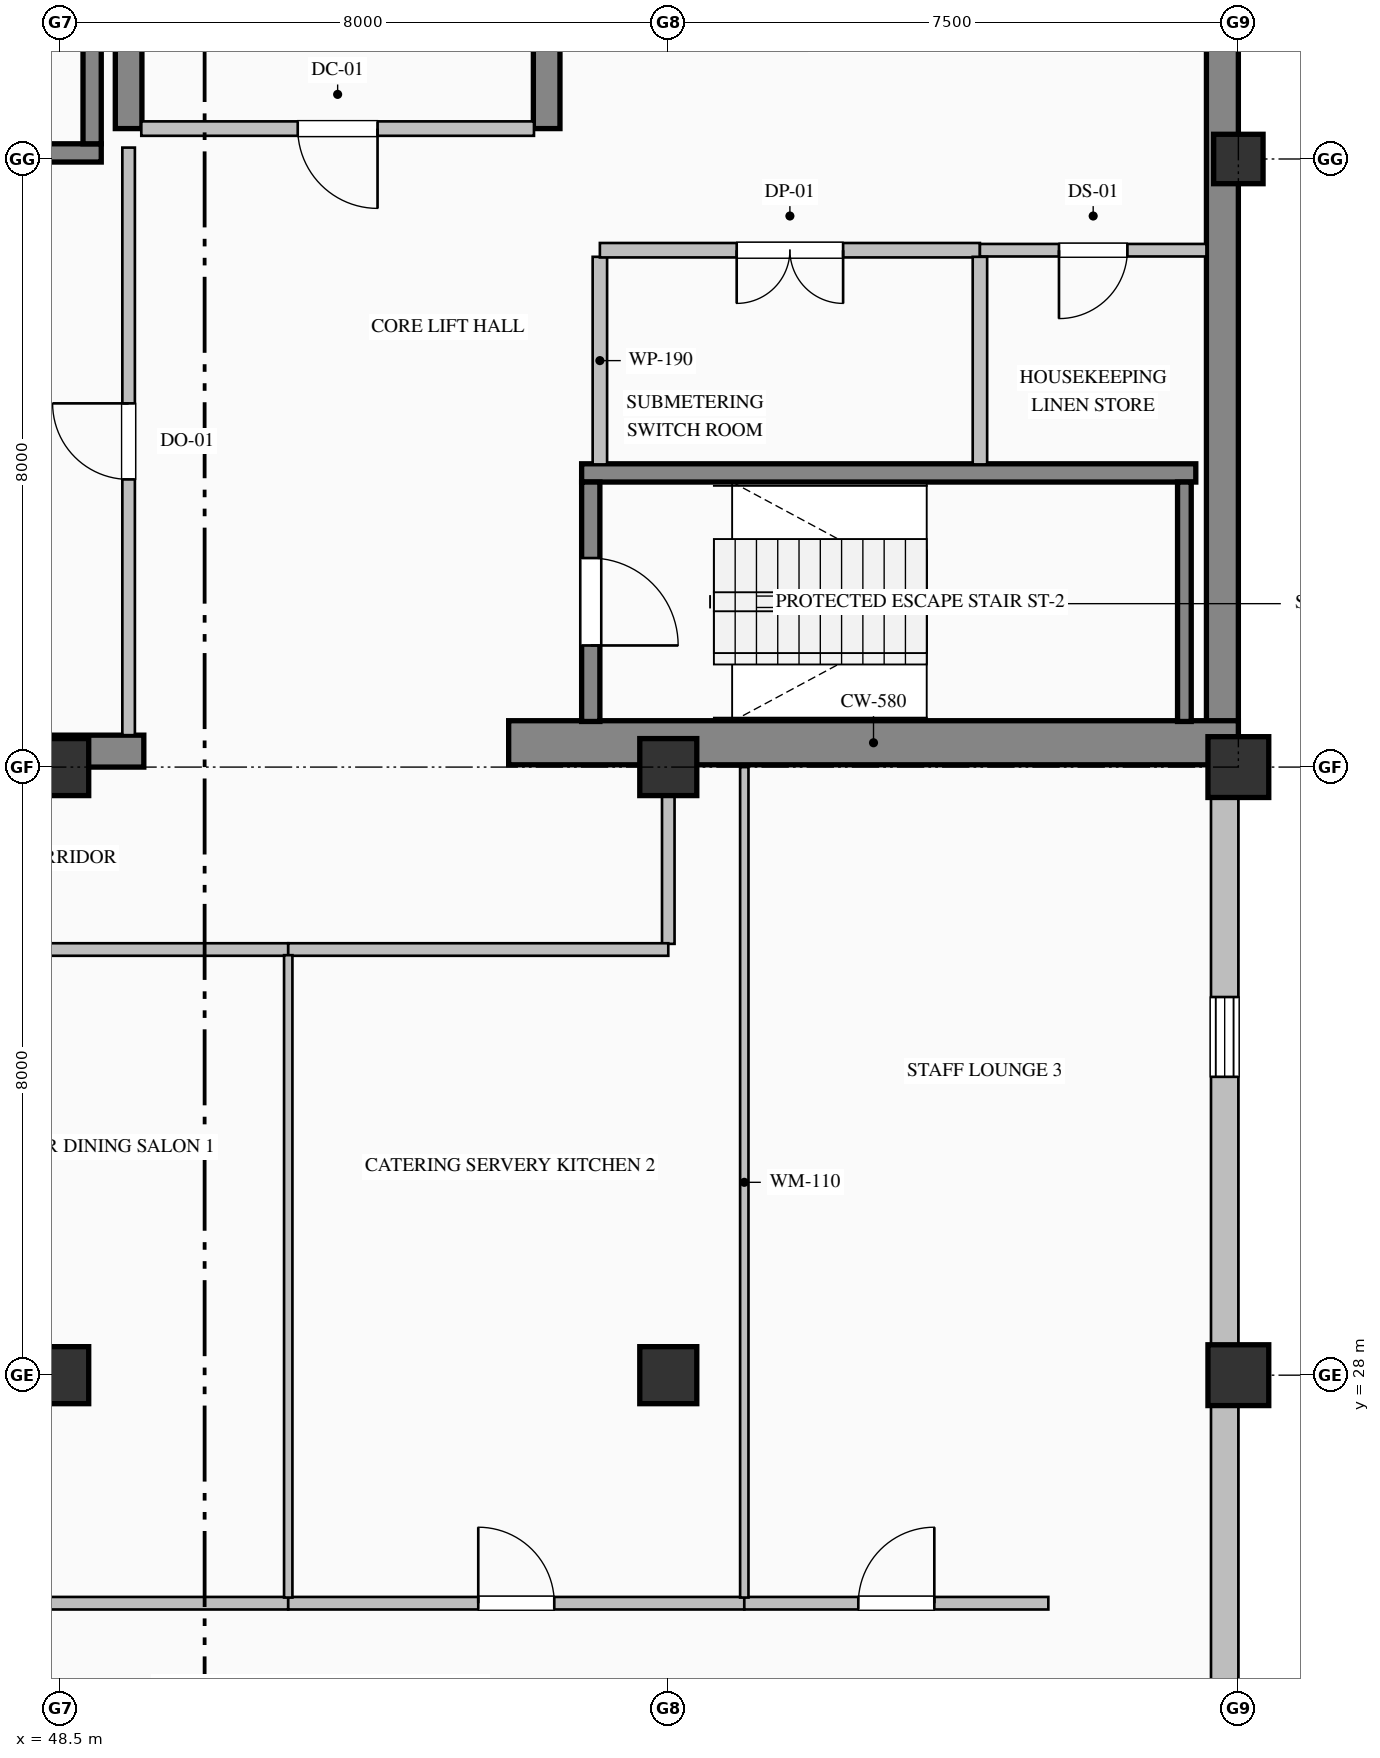
"""IFC4 building model, lengths in metres.
Left out: names, types, materials, properties, quantities, classifications, styles, units other than length and angle.
Written with IfcOpenShell. Run it as: python <this file> out.ifc"""

import sys

from ifc_helpers import new_model, si_unit, direction, frame, frame_2d, origin, origin_2d, place, context, subcontext, project, spatial, rectangle, hollow_rectangle, extrude, element, fill, save


model = new_model("IFC4")
c1 = context("Model", 3, precision=1e-05, world=origin(), true_north=direction((0.0, 1.0)))
c2 = subcontext(c1, "Body", "Model", "MODEL_VIEW")
j1 = project(units=[si_unit("LENGTHUNIT", "METRE"), si_unit("PLANEANGLEUNIT", "RADIAN")], contexts=[c1])
p1 = place(None, origin())
s1 = spatial("IfcSite", under=j1, at=p1, CompositionType="ELEMENT")
p2 = place(p1, origin())
s2 = spatial("IfcBuilding", under=s1, at=p2, CompositionType="ELEMENT")
p3 = place(p2, frame((0.0, 0.0, 327.2)))
s3 = spatial("IfcBuildingStorey", under=s2, at=p3, CompositionType="ELEMENT", Elevation=327.2)
p4 = place(p3, frame((63.79, 36.32, 0.0), z_axis=(0.0, 0.0, 1.0), x_axis=(0.0, 1.0, 0.0)))
e1 = element("IfcWall", 1, at=p4, inside=s3, PredefinedType="SHEAR", context=c2, shape_type="SweptSolid", body=[
    extrude(rectangle(XDim=15.26, YDim=0.42, at=frame_2d((7.63, 0.0))), origin(), (0.0, 0.0, 1.0), 3.785),
])
p5 = place(p3, frame((40.5, 36.21, 0.0), z_axis=(0.0, 0.0, 1.0), x_axis=(1.0, 0.0, 0.0)))
e2 = element("IfcWall", 2, at=p5, inside=s3, PredefinedType="SHEAR", context=c2, shape_type="SweptSolid", body=[
    extrude(rectangle(XDim=9.1, YDim=0.42, at=frame_2d((4.55, 0.0))), origin(), (0.0, 0.0, 1.0), 3.785),
])
p6 = place(p3, frame((54.4, 36.32, 0.0), z_axis=(0.0, 0.0, 1.0), x_axis=(1.0, 0.0, 0.0)))
e3 = element("IfcWall", 3, at=p6, inside=s3, PredefinedType="SHEAR", context=c2, shape_type="SweptSolid", body=[
    extrude(rectangle(XDim=9.6, YDim=0.58, at=frame_2d((4.8, 0.0))), origin(), (0.0, 0.0, 1.0), 4.0),
])
p7 = place(p3, frame((49.4, 44.4, 0.0), z_axis=(0.0, 0.0, 1.0), x_axis=(0.0, 1.0, 0.0)))
e4 = element("IfcWall", 4, at=p7, inside=s3, PredefinedType="SHEAR", context=c2, shape_type="SweptSolid", body=[
    extrude(rectangle(XDim=3.0, YDim=0.35, at=frame_2d((1.5, 0.0))), origin(), (0.0, 0.0, 1.0), 3.785),
])
p8 = place(p3, frame((54.9, 44.4, 0.0), z_axis=(0.0, 0.0, 1.0), x_axis=(0.0, 1.0, 0.0)))
e5 = element("IfcWall", 5, at=p8, inside=s3, PredefinedType="SHEAR", context=c2, shape_type="SweptSolid", body=[
    extrude(rectangle(XDim=7.18, YDim=0.35, at=frame_2d((3.59, 0.0))), origin(), (0.0, 0.0, 1.0), 3.785),
])
for number, where, z_axis, x_axis in (
    (6, (48.5, 28.0, 0.0), (0.0, 0.0, 1.0), (1.0, 0.0, 0.0)),
    (7, (48.5, 36.0, 0.0), (0.0, 0.0, 1.0), (1.0, 0.0, 0.0)),
    (8, (56.5, 28.0, 0.0), (0.0, 0.0, 1.0), (1.0, 0.0, 0.0)),
    (9, (56.5, 36.0, 0.0), (0.0, 0.0, 1.0), (1.0, 0.0, 0.0)),
):
    element("IfcColumn", number, at=place(p3, frame(where, z_axis=z_axis, x_axis=x_axis)), inside=s3, PredefinedType="COLUMN", context=c2, shape_type="SweptSolid", body=[
        extrude(rectangle(XDim=0.75, YDim=0.75, at=origin_2d()), origin(), (0.0, 0.0, 1.0), 4.0),
    ])
for number, where, z_axis, x_axis in (
    (10, (64.0, 28.0, 0.0), (0.0, 0.0, 1.0), (1.0, 0.0, 0.0)),
    (11, (64.0, 36.0, 0.0), (0.0, 0.0, 1.0), (1.0, 0.0, 0.0)),
):
    element("IfcColumn", number, at=place(p3, frame(where, z_axis=z_axis, x_axis=x_axis)), inside=s3, PredefinedType="COLUMN", context=c2, shape_type="SweptSolid", body=[
        extrude(hollow_rectangle(XDim=0.8, YDim=0.8, WallThickness=0.032, at=origin_2d()), origin(), (0.0, 0.0, 1.0), 4.0),
    ])
p9 = place(p3, frame((64.0, 44.0, 0.0), z_axis=(0.0, 0.0, 1.0), x_axis=(1.0, 0.0, 0.0)))
e12 = element("IfcColumn", 12, at=p9, inside=s3, PredefinedType="COLUMN", context=c2, shape_type="SweptSolid", body=[
    extrude(hollow_rectangle(XDim=0.65, YDim=0.65, WallThickness=0.028, at=origin_2d()), origin(), (0.0, 0.0, 1.0), 4.0),
])
p10 = place(p3, frame((63.82, 36.05, 0.0), z_axis=(0.0, 0.0, 1.0), x_axis=(0.0, -1.0, 0.0)))
e13 = element("IfcWall", 13, at=p10, inside=s3, PredefinedType="SOLIDWALL", context=c2, shape_type="SweptSolid", body=[
    extrude(rectangle(XDim=13.55, YDim=0.36, at=frame_2d((6.775, 0.0))), origin(), (0.0, 0.0, 1.0), 3.335),
])
p11 = place(p10, frame((3.075, 0.0, 0.8)))
e14 = element("IfcOpeningElement", 14, at=p11, cuts=e13, PredefinedType="OPENING", context=c2, shape_type="SweptSolid", body=[
    extrude(rectangle(XDim=1.05, YDim=2.15, at=frame_2d((0.525, 1.075))), frame((0.0, 0.19, 0.0), z_axis=(0.0, -1.0, 0.0), x_axis=(1.0, 0.0, 0.0)), (0.0, 0.0, 1.0), 0.38),
])
p12 = place(p3, frame((49.04, 44.08, 0.0), z_axis=(0.0, 0.0, 1.0), x_axis=(-1.0, 0.0, 0.0)))
e15 = element("IfcWall", 15, at=p12, inside=s3, PredefinedType="SOLIDWALL", context=c2, shape_type="SweptSolid", body=[
    extrude(rectangle(XDim=8.08, YDim=0.24, at=frame_2d((4.04, 0.0))), origin(), (0.0, 0.0, 1.0), 4.0),
])
p13 = place(p3, frame((48.92, 44.2, 0.0), z_axis=(0.0, 0.0, 1.0), x_axis=(0.0, 1.0, 0.0)))
e16 = element("IfcWall", 16, at=p13, inside=s3, PredefinedType="SOLIDWALL", context=c2, shape_type="SweptSolid", body=[
    extrude(rectangle(XDim=3.15, YDim=0.24, at=frame_2d((1.575, 0.0))), origin(), (0.0, 0.0, 1.0), 4.0),
])
p14 = place(p3, frame((55.36, 39.87, 0.0), z_axis=(0.0, 0.0, 1.0), x_axis=(1.0, 0.0, 0.0)))
e17 = element("IfcWall", 17, at=p14, inside=s3, PredefinedType="SOLIDWALL", context=c2, shape_type="SweptSolid", body=[
    extrude(rectangle(XDim=8.08, YDim=0.24, at=frame_2d((4.04, 0.0))), origin(), (0.0, 0.0, 1.0), 4.0),
])
p15 = place(p3, frame((55.48, 39.75, 0.0), z_axis=(0.0, 0.0, 1.0), x_axis=(0.0, -1.0, 0.0)))
e18 = element("IfcWall", 18, at=p15, inside=s3, PredefinedType="SOLIDWALL", context=c2, shape_type="SweptSolid", body=[
    extrude(rectangle(XDim=3.15, YDim=0.24, at=frame_2d((1.575, 0.0))), origin(), (0.0, 0.0, 1.0), 4.0),
])
p16 = place(p15, frame((1.0, 0.0, 0.0)))
e19 = element("IfcOpeningElement", 19, at=p16, cuts=e18, PredefinedType="OPENING", context=c2, shape_type="SweptSolid", body=[
    extrude(rectangle(XDim=1.15, YDim=2.2, at=frame_2d((0.575, 1.1))), frame((0.0, 0.13, 0.0), z_axis=(0.0, -1.0, 0.0), x_axis=(1.0, 0.0, 0.0)), (0.0, 0.0, 1.0), 0.26),
])
p17 = place(p3, frame((63.29, 36.6, 0.0), z_axis=(0.0, 0.0, 1.0), x_axis=(0.0, 1.0, 0.0)))
e20 = element("IfcWall", 20, at=p17, inside=s3, PredefinedType="SOLIDWALL", context=c2, shape_type="SweptSolid", body=[
    extrude(rectangle(XDim=3.15, YDim=0.18, at=frame_2d((1.575, 0.0))), origin(), (0.0, 0.0, 1.0), 4.0),
])
p18 = place(p3, frame((54.733, 44.4, 0.0), z_axis=(0.0, 0.0, 1.0), x_axis=(-1.0, 0.0, 0.0)))
e21 = element("IfcWall", 21, at=p18, inside=s3, PredefinedType="PARTITIONING", context=c2, shape_type="SweptSolid", body=[
    extrude(rectangle(XDim=5.166, YDim=0.19, at=frame_2d((2.583, 0.0))), origin(), (0.0, 0.0, 1.0), 3.785),
])
p19 = place(p18, frame((2.058, 0.0, 0.0)))
e22 = element("IfcOpeningElement", 22, at=p19, cuts=e21, PredefinedType="OPENING", context=c2, shape_type="SweptSolid", body=[
    extrude(rectangle(XDim=1.05, YDim=2.15, at=frame_2d((0.525, 1.075))), frame((0.0, 0.105, 0.0), z_axis=(0.0, -1.0, 0.0), x_axis=(1.0, 0.0, 0.0)), (0.0, 0.0, 1.0), 0.21),
])
p20 = place(p3, frame((49.4, 36.42, 0.0), z_axis=(0.0, 0.0, 1.0), x_axis=(0.0, 1.0, 0.0)))
e23 = element("IfcWall", 23, at=p20, inside=s3, PredefinedType="PARTITIONING", context=c2, shape_type="SweptSolid", body=[
    extrude(rectangle(XDim=7.73, YDim=0.165, at=frame_2d((3.865, 0.0))), origin(), (0.0, 0.0, 1.0), 3.027),
])
p21 = place(p20, frame((3.365, 0.0, 0.0)))
e24 = element("IfcOpeningElement", 24, at=p21, cuts=e23, PredefinedType="OPENING", context=c2, shape_type="SweptSolid", body=[
    extrude(rectangle(XDim=1.0, YDim=2.15, at=frame_2d((0.5, 1.075))), frame((0.0, 0.093, 0.0), z_axis=(0.0, -1.0, 0.0), x_axis=(1.0, 0.0, 0.0)), (0.0, 0.0, 1.0), 0.185),
])
p22 = place(p3, frame((55.6, 42.713, 0.0), z_axis=(0.0, 0.0, 1.0), x_axis=(0.0, -1.0, 0.0)))
e25 = element("IfcWall", 25, at=p22, inside=s3, PredefinedType="PARTITIONING", context=c2, shape_type="SweptSolid", body=[
    extrude(rectangle(XDim=2.731, YDim=0.19, at=frame_2d((1.365, 0.0))), origin(), (0.0, 0.0, 1.0), 3.785),
])
p23 = place(p3, frame((60.6, 42.8, 0.0), z_axis=(0.0, 0.0, 1.0), x_axis=(-1.0, 0.0, 0.0)))
e26 = element("IfcWall", 26, at=p23, inside=s3, PredefinedType="PARTITIONING", context=c2, shape_type="SweptSolid", body=[
    extrude(rectangle(XDim=5.0, YDim=0.19, at=frame_2d((2.5, 0.0))), origin(), (0.0, 0.0, 1.0), 3.785),
])
p24 = place(p23, frame((1.8, 0.0, 0.0)))
e27 = element("IfcOpeningElement", 27, at=p24, cuts=e26, PredefinedType="OPENING", context=c2, shape_type="SweptSolid", body=[
    extrude(rectangle(XDim=1.4, YDim=2.25, at=frame_2d((0.7, 1.125))), frame((0.0, 0.105, 0.0), z_axis=(0.0, -1.0, 0.0), x_axis=(1.0, 0.0, 0.0)), (0.0, 0.0, 1.0), 0.21),
])
p25 = place(p3, frame((63.58, 42.8, 0.0), z_axis=(0.0, 0.0, 1.0), x_axis=(-1.0, 0.0, 0.0)))
e28 = element("IfcWall", 28, at=p25, inside=s3, PredefinedType="PARTITIONING", context=c2, shape_type="SweptSolid", body=[
    extrude(rectangle(XDim=2.98, YDim=0.165, at=frame_2d((1.49, 0.0))), origin(), (0.0, 0.0, 1.0), 3.785),
])
p26 = place(p25, frame((1.04, 0.0, 0.0)))
e29 = element("IfcOpeningElement", 29, at=p26, cuts=e28, PredefinedType="OPENING", context=c2, shape_type="SweptSolid", body=[
    extrude(rectangle(XDim=0.9, YDim=2.15, at=frame_2d((0.45, 1.075))), frame((0.0, 0.093, 0.0), z_axis=(0.0, -1.0, 0.0), x_axis=(1.0, 0.0, 0.0)), (0.0, 0.0, 1.0), 0.185),
])
p27 = place(p3, frame((60.6, 42.713, 0.0), z_axis=(0.0, 0.0, 1.0), x_axis=(0.0, -1.0, 0.0)))
e30 = element("IfcWall", 30, at=p27, inside=s3, PredefinedType="PARTITIONING", context=c2, shape_type="SweptSolid", body=[
    extrude(rectangle(XDim=2.731, YDim=0.19, at=frame_2d((1.365, 0.0))), origin(), (0.0, 0.0, 1.0), 3.785),
])
p28 = place(p3, frame((51.5, 33.6, 0.0), z_axis=(0.0, 0.0, 1.0), x_axis=(-1.0, 0.0, 0.0)))
e31 = element("IfcWall", 31, at=p28, inside=s3, PredefinedType="PARTITIONING", context=c2, shape_type="SweptSolid", body=[
    extrude(rectangle(XDim=6.3, YDim=0.165, at=frame_2d((3.15, 0.0))), origin(), (0.0, 0.0, 1.0), 3.785),
])
p29 = place(p3, frame((56.5, 36.0, 0.0), z_axis=(0.0, 0.0, 1.0), x_axis=(0.0, -1.0, 0.0)))
e32 = element("IfcWall", 32, at=p29, inside=s3, PredefinedType="PARTITIONING", context=c2, shape_type="SweptSolid", body=[
    extrude(rectangle(XDim=2.325, YDim=0.165, at=frame_2d((1.163, 0.0))), origin(), (0.0, 0.0, 1.0), 3.177),
])
p30 = place(p3, frame((56.5, 33.6, 0.0), z_axis=(0.0, 0.0, 1.0), x_axis=(-1.0, 0.0, 0.0)))
e33 = element("IfcWall", 33, at=p30, inside=s3, PredefinedType="PARTITIONING", context=c2, shape_type="SweptSolid", body=[
    extrude(rectangle(XDim=5.0, YDim=0.165, at=frame_2d((2.5, 0.0))), origin(), (0.0, 0.0, 1.0), 3.785),
])
p31 = place(p3, frame((45.2, 25.0, 0.0), z_axis=(0.0, 0.0, 1.0), x_axis=(1.0, 0.0, 0.0)))
e34 = element("IfcWall", 34, at=p31, inside=s3, PredefinedType="PARTITIONING", context=c2, shape_type="SweptSolid", body=[
    extrude(rectangle(XDim=6.3, YDim=0.165, at=frame_2d((3.15, 0.0))), origin(), (0.0, 0.0, 1.0), 3.785),
])
p32 = place(p3, frame((51.5, 25.0, 0.0), z_axis=(0.0, 0.0, 1.0), x_axis=(1.0, 0.0, 0.0)))
e35 = element("IfcWall", 35, at=p32, inside=s3, PredefinedType="PARTITIONING", context=c2, shape_type="SweptSolid", body=[
    extrude(rectangle(XDim=6.0, YDim=0.165, at=frame_2d((3.0, 0.0))), origin(), (0.0, 0.0, 1.0), 3.785),
])
p33 = place(p32, frame((2.5, 0.0, 0.0)))
e36 = element("IfcOpeningElement", 36, at=p33, cuts=e35, PredefinedType="OPENING", context=c2, shape_type="SweptSolid", body=[
    extrude(rectangle(XDim=1.0, YDim=2.15, at=frame_2d((0.5, 1.075))), frame((0.0, 0.093, 0.0), z_axis=(0.0, -1.0, 0.0), x_axis=(1.0, 0.0, 0.0)), (0.0, 0.0, 1.0), 0.185),
])
p34 = place(p3, frame((57.5, 25.0, 0.0), z_axis=(0.0, 0.0, 1.0), x_axis=(1.0, 0.0, 0.0)))
e37 = element("IfcWall", 37, at=p34, inside=s3, PredefinedType="PARTITIONING", context=c2, shape_type="SweptSolid", body=[
    extrude(rectangle(XDim=4.0, YDim=0.165, at=frame_2d((2.0, 0.0))), origin(), (0.0, 0.0, 1.0), 3.785),
])
p35 = place(p34, frame((1.5, 0.0, 0.0)))
e38 = element("IfcOpeningElement", 38, at=p35, cuts=e37, PredefinedType="OPENING", context=c2, shape_type="SweptSolid", body=[
    extrude(rectangle(XDim=1.0, YDim=2.15, at=frame_2d((0.5, 1.075))), frame((0.0, 0.093, 0.0), z_axis=(0.0, -1.0, 0.0), x_axis=(1.0, 0.0, 0.0)), (0.0, 0.0, 1.0), 0.185),
])
p36 = place(p3, frame((51.5, 33.525, 0.0), z_axis=(0.0, 0.0, 1.0), x_axis=(0.0, -1.0, 0.0)))
e39 = element("IfcWall", 39, at=p36, inside=s3, PredefinedType="MOVABLE", context=c2, shape_type="SweptSolid", body=[
    extrude(rectangle(XDim=8.451, YDim=0.11, at=frame_2d((4.226, 0.0))), origin(), (0.0, 0.0, 1.0), 3.785),
])
p37 = place(p3, frame((57.5, 36.0, 0.0), z_axis=(0.0, 0.0, 1.0), x_axis=(0.0, -1.0, 0.0)))
e40 = element("IfcWall", 40, at=p37, inside=s3, PredefinedType="MOVABLE", context=c2, shape_type="SweptSolid", body=[
    extrude(rectangle(XDim=10.926, YDim=0.11, at=frame_2d((5.463, 0.0))), origin(), (0.0, 0.0, 1.0), 3.785),
])
p38 = place(p11, origin())
e41 = element("IfcWindow", 41, at=p38, inside=s3, PartitioningType="SINGLE_PANEL", PredefinedType="WINDOW", context=c2, shape_type="SweptSolid", body=[
    extrude(rectangle(XDim=1.05, YDim=2.15, at=frame_2d((0.525, 1.075))), frame((0.0, 0.15, 0.0), z_axis=(0.0, -1.0, 0.0), x_axis=(1.0, 0.0, 0.0)), (0.0, 0.0, 1.0), 0.06),
])
fill(e14, e41)
p39 = place(p16, origin())
e42 = element("IfcDoor", 42, at=p39, inside=s3, OperationType="SINGLE_SWING_RIGHT", PredefinedType="DOOR", context=c2, shape_type="SweptSolid", body=[
    extrude(rectangle(XDim=1.15, YDim=2.2, at=frame_2d((0.575, 1.1))), frame((0.0, 0.025, 0.0), z_axis=(0.0, -1.0, 0.0), x_axis=(1.0, 0.0, 0.0)), (0.0, 0.0, 1.0), 0.05),
])
fill(e19, e42)
p40 = place(p19, origin())
e43 = element("IfcDoor", 43, at=p40, inside=s3, OperationType="SINGLE_SWING_LEFT", PredefinedType="DOOR", context=c2, shape_type="SweptSolid", body=[
    extrude(rectangle(XDim=1.05, YDim=2.15, at=frame_2d((0.525, 1.075))), frame((0.0, 0.025, 0.0), z_axis=(0.0, -1.0, 0.0), x_axis=(1.0, 0.0, 0.0)), (0.0, 0.0, 1.0), 0.05),
])
fill(e22, e43)
p41 = place(p21, origin())
e44 = element("IfcDoor", 44, at=p41, inside=s3, OperationType="SINGLE_SWING_RIGHT", PredefinedType="DOOR", context=c2, shape_type="SweptSolid", body=[
    extrude(rectangle(XDim=1.0, YDim=2.15, at=frame_2d((0.5, 1.075))), frame((0.0, 0.025, 0.0), z_axis=(0.0, -1.0, 0.0), x_axis=(1.0, 0.0, 0.0)), (0.0, 0.0, 1.0), 0.05),
])
fill(e24, e44)
p42 = place(p24, origin())
e45 = element("IfcDoor", 45, at=p42, inside=s3, OperationType="DOUBLE_DOOR_SINGLE_SWING", PredefinedType="DOOR", context=c2, shape_type="SweptSolid", body=[
    extrude(rectangle(XDim=1.4, YDim=2.25, at=frame_2d((0.7, 1.125))), frame((0.0, 0.025, 0.0), z_axis=(0.0, -1.0, 0.0), x_axis=(1.0, 0.0, 0.0)), (0.0, 0.0, 1.0), 0.05),
])
fill(e27, e45)
p43 = place(p26, origin())
e46 = element("IfcDoor", 46, at=p43, inside=s3, OperationType="SINGLE_SWING_RIGHT", PredefinedType="DOOR", context=c2, shape_type="SweptSolid", body=[
    extrude(rectangle(XDim=0.9, YDim=2.15, at=frame_2d((0.45, 1.075))), frame((0.0, 0.025, 0.0), z_axis=(0.0, -1.0, 0.0), x_axis=(1.0, 0.0, 0.0)), (0.0, 0.0, 1.0), 0.05),
])
fill(e29, e46)
p44 = place(p33, origin())
e47 = element("IfcDoor", 47, at=p44, inside=s3, OperationType="SINGLE_SWING_LEFT", PredefinedType="DOOR", context=c2, shape_type="SweptSolid", body=[
    extrude(rectangle(XDim=1.0, YDim=2.15, at=frame_2d((0.5, 1.075))), frame((0.0, 0.025, 0.0), z_axis=(0.0, -1.0, 0.0), x_axis=(1.0, 0.0, 0.0)), (0.0, 0.0, 1.0), 0.05),
])
fill(e36, e47)
p45 = place(p35, origin())
e48 = element("IfcDoor", 48, at=p45, inside=s3, OperationType="SINGLE_SWING_RIGHT", PredefinedType="DOOR", context=c2, shape_type="SweptSolid", body=[
    extrude(rectangle(XDim=1.0, YDim=2.15, at=frame_2d((0.5, 1.075))), frame((0.0, 0.025, 0.0), z_axis=(0.0, -1.0, 0.0), x_axis=(1.0, 0.0, 0.0)), (0.0, 0.0, 1.0), 0.05),
])
fill(e38, e48)
save(model, sys.argv[1])
